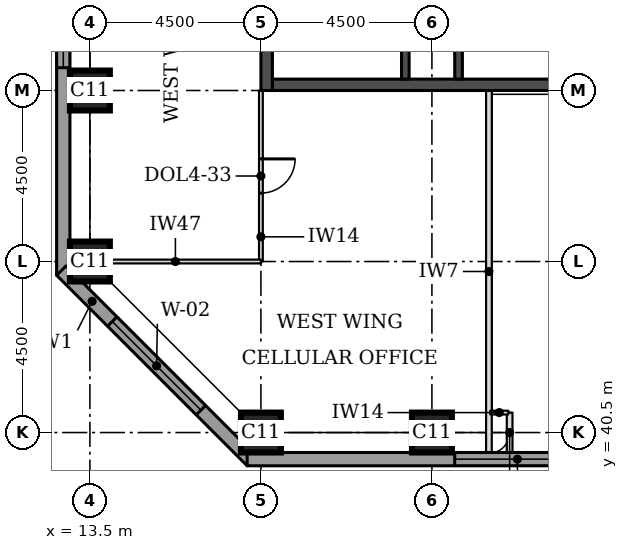
"""IFC4 building model, lengths in metres.
Left out: names, types, materials, properties, quantities, classifications, styles, units other than length and angle.
Written with IfcOpenShell. Run it as: python <this file> out.ifc"""

import sys

from ifc_helpers import new_model, si_unit, direction, frame, frame_2d, origin, origin_2d, place, context, subcontext, project, spatial, rectangle, extrude, element, fill, save


model = new_model("IFC4")
c1 = context("Model", 3, precision=1e-05, world=origin(), true_north=direction((0.0, 1.0)))
c2 = subcontext(c1, "Body", "Model", "MODEL_VIEW")
j1 = project(units=[si_unit("LENGTHUNIT", "METRE"), si_unit("PLANEANGLEUNIT", "RADIAN")], contexts=[c1])
p1 = place(None, origin())
s1 = spatial("IfcSite", under=j1, at=p1, CompositionType="ELEMENT")
p2 = place(p1, origin())
s2 = spatial("IfcBuilding", under=s1, at=p2, CompositionType="ELEMENT")
p3 = place(p2, frame((0.0, 0.0, 101.1)))
s3 = spatial("IfcBuildingStorey", under=s2, at=p3, CompositionType="ELEMENT", Elevation=101.1)
for number, where, z_axis, x_axis in (
    (1, (18.0, 40.5, 0.0), (0.0, 0.0, 1.0), (1.0, 0.0, 0.0)),
    (2, (22.5, 40.5, 0.0), (0.0, 0.0, 1.0), (1.0, 0.0, 0.0)),
    (3, (13.5, 45.0, 0.0), (0.0, 0.0, 1.0), (1.0, 0.0, 0.0)),
    (4, (13.5, 49.5, 0.0), (0.0, 0.0, 1.0), (1.0, 0.0, 0.0)),
):
    element("IfcColumn", number, at=place(p3, frame(where, z_axis=z_axis, x_axis=x_axis)), inside=s3, PredefinedType="COLUMN", context=c2, shape_type="SweptSolid", body=[
        extrude(rectangle(XDim=1.05, YDim=1.05, at=origin_2d()), origin(), (0.0, 0.0, 1.0), 3.7),
    ])
p4 = place(p3, frame((18.3, 49.65, 0.0), z_axis=(0.0, 0.0, 1.0), x_axis=(1.0, 0.0, 0.0)))
e5 = element("IfcWall", 5, at=p4, inside=s3, PredefinedType="SHEAR", context=c2, shape_type="SweptSolid", body=[
    extrude(rectangle(XDim=8.4, YDim=0.3, at=frame_2d((4.2, 0.0))), origin(), (0.0, 0.0, 1.0), 3.7),
])
p5 = place(p3, frame((18.15, 49.5, 0.0), z_axis=(0.0, 0.0, 1.0), x_axis=(0.0, 1.0, 0.0)))
e6 = element("IfcWall", 6, at=p5, inside=s3, PredefinedType="SHEAR", context=c2, shape_type="SweptSolid", body=[
    extrude(rectangle(XDim=9.0, YDim=0.3, at=frame_2d((4.5, 0.0))), origin(), (0.0, 0.0, 1.0), 3.7),
])
p6 = place(p3, frame((12.8, 58.862, 0.0), z_axis=(0.0, 0.0, 1.0), x_axis=(0.0, -1.0, 0.0)))
e7 = element("IfcWall", 7, at=p6, inside=s3, PredefinedType="STANDARD", context=c2, shape_type="SweptSolid", body=[
    extrude(rectangle(XDim=14.225, YDim=0.35, at=frame_2d((7.112, 0.0))), origin(), (0.0, 0.0, 1.0), 3.525),
])
p7 = place(p6, frame((5.462, 0.0, 0.9)))
e8 = element("IfcOpeningElement", 8, at=p7, cuts=e7, PredefinedType="OPENING", context=c2, shape_type="SweptSolid", body=[
    extrude(rectangle(XDim=3.3, YDim=1.9, at=frame_2d((1.65, 0.95))), frame((0.0, 0.185, 0.0), z_axis=(0.0, -1.0, 0.0), x_axis=(1.0, 0.0, 0.0)), (0.0, 0.0, 1.0), 0.37),
])
p8 = place(p3, frame((12.749, 44.761, 0.0), z_axis=(0.0, 0.0, 1.0), x_axis=(0.707106781187, -0.707106781187, 0.0)))
e9 = element("IfcWall", 9, at=p8, inside=s3, PredefinedType="STANDARD", context=c2, shape_type="SweptSolid", body=[
    extrude(rectangle(XDim=7.089, YDim=0.35, at=frame_2d((3.544, 0.0))), origin(), (0.0, 0.0, 1.0), 3.525),
])
p9 = place(p8, frame((1.894, 0.0, 0.9)))
e10 = element("IfcOpeningElement", 10, at=p9, cuts=e9, PredefinedType="OPENING", context=c2, shape_type="SweptSolid", body=[
    extrude(rectangle(XDim=3.3, YDim=1.9, at=frame_2d((1.65, 0.95))), frame((0.0, 0.185, 0.0), z_axis=(0.0, -1.0, 0.0), x_axis=(1.0, 0.0, 0.0)), (0.0, 0.0, 1.0), 0.37),
])
p10 = place(p3, frame((17.638, 39.8, 0.0), z_axis=(0.0, 0.0, 1.0), x_axis=(1.0, 0.0, 0.0)))
e11 = element("IfcWall", 11, at=p10, inside=s3, PredefinedType="STANDARD", context=c2, shape_type="SweptSolid", body=[
    extrude(rectangle(XDim=17.837, YDim=0.35, at=frame_2d((8.919, 0.0))), origin(), (0.0, 0.0, 1.0), 3.525),
])
p11 = place(p10, frame((5.462, 0.0, 0.9)))
e12 = element("IfcOpeningElement", 12, at=p11, cuts=e11, PredefinedType="OPENING", context=c2, shape_type="SweptSolid", body=[
    extrude(rectangle(XDim=3.3, YDim=1.9, at=frame_2d((1.65, 0.95))), frame((0.0, 0.185, 0.0), z_axis=(0.0, -1.0, 0.0), x_axis=(1.0, 0.0, 0.0)), (0.0, 0.0, 1.0), 0.37),
])
p12 = place(p10, frame((14.037, 0.0, 0.9)))
e13 = element("IfcOpeningElement", 13, at=p12, cuts=e11, PredefinedType="OPENING", context=c2, shape_type="SweptSolid", body=[
    extrude(rectangle(XDim=3.3, YDim=1.9, at=frame_2d((1.65, 0.95))), frame((0.0, 0.185, 0.0), z_axis=(0.0, -1.0, 0.0), x_axis=(1.0, 0.0, 0.0)), (0.0, 0.0, 1.0), 0.37),
])
p13 = place(p3, frame((24.0, 39.975, 0.0), z_axis=(0.0, 0.0, 1.0), x_axis=(0.0, 1.0, 0.0)))
e14 = element("IfcWall", 14, at=p13, inside=s3, PredefinedType="PARTITIONING", context=c2, shape_type="SweptSolid", body=[
    extrude(rectangle(XDim=9.525, YDim=0.15, at=frame_2d((4.762, 0.0))), origin(), (0.0, 0.0, 1.0), 3.55),
])
p14 = place(p3, frame((18.0, 49.5, 0.0), z_axis=(0.0, 0.0, 1.0), x_axis=(0.0, -1.0, 0.0)))
e15 = element("IfcWall", 15, at=p14, inside=s3, PredefinedType="PARTITIONING", context=c2, shape_type="SweptSolid", body=[
    extrude(rectangle(XDim=4.5, YDim=0.1, at=frame_2d((2.25, 0.0))), origin(), (0.0, 0.0, 1.0), 3.55),
])
p15 = place(p14, frame((1.8, 0.0, 0.0)))
e16 = element("IfcOpeningElement", 16, at=p15, cuts=e15, PredefinedType="OPENING", context=c2, shape_type="SweptSolid", body=[
    extrude(rectangle(XDim=0.9, YDim=2.1, at=frame_2d((0.45, 1.05))), frame((0.0, 0.06, 0.0), z_axis=(0.0, -1.0, 0.0), x_axis=(1.0, 0.0, 0.0)), (0.0, 0.0, 1.0), 0.12),
])
p16 = place(p3, frame((18.0, 45.0, 0.0), z_axis=(0.0, 0.0, 1.0), x_axis=(-1.0, 0.0, 0.0)))
e17 = element("IfcWall", 17, at=p16, inside=s3, PredefinedType="PARTITIONING", context=c2, shape_type="SweptSolid", body=[
    extrude(rectangle(XDim=4.5, YDim=0.1, at=frame_2d((2.25, 0.0))), origin(), (0.0, 0.0, 1.0), 2.55),
])
p17 = place(p3, frame((24.545, 39.975, 0.0), z_axis=(0.0, 0.0, 1.0), x_axis=(0.0, 1.0, 0.0)))
e18 = element("IfcWall", 18, at=p17, inside=s3, PredefinedType="PARTITIONING", context=c2, shape_type="SweptSolid", body=[
    extrude(rectangle(XDim=1.05, YDim=0.15, at=frame_2d((0.525, 0.0))), origin(), (0.0, 0.0, 1.0), 3.55),
])
p18 = place(p3, frame((24.51, 41.025, 0.0), z_axis=(0.0, 0.0, 1.0), x_axis=(-1.0, 0.0, 0.0)))
e19 = element("IfcWall", 19, at=p18, inside=s3, PredefinedType="PARTITIONING", context=c2, shape_type="SweptSolid", body=[
    extrude(rectangle(XDim=0.475, YDim=0.1, at=frame_2d((0.238, 0.0))), origin(), (0.0, 0.0, 1.0), 3.55),
])
for number, where, z_axis, x_axis in (
    (20, (21.8, 49.8, 0.0), (0.0, 0.0, 1.0), (0.0, 1.0, 0.0)),
    (21, (23.2, 49.8, 0.0), (0.0, 0.0, 1.0), (0.0, 1.0, 0.0)),
):
    element("IfcWall", number, at=place(p3, frame(where, z_axis=z_axis, x_axis=x_axis)), inside=s3, PredefinedType="SOLIDWALL", context=c2, shape_type="SweptSolid", body=[
        extrude(rectangle(XDim=6.05, YDim=0.2, at=frame_2d((3.025, 0.0))), origin(), (0.0, 0.0, 1.0), 3.55),
    ])
p19 = place(p7, origin())
e22 = element("IfcWindow", 22, at=p19, inside=s3, PartitioningType="SINGLE_PANEL", PredefinedType="WINDOW", context=c2, shape_type="SweptSolid", body=[
    extrude(rectangle(XDim=3.3, YDim=1.9, at=frame_2d((1.65, 0.95))), frame((0.0, 0.085, 0.0), z_axis=(0.0, -1.0, 0.0), x_axis=(1.0, 0.0, 0.0)), (0.0, 0.0, 1.0), 0.06),
])
fill(e8, e22)
p20 = place(p9, origin())
e23 = element("IfcWindow", 23, at=p20, inside=s3, PartitioningType="SINGLE_PANEL", PredefinedType="WINDOW", context=c2, shape_type="SweptSolid", body=[
    extrude(rectangle(XDim=3.3, YDim=1.9, at=frame_2d((1.65, 0.95))), frame((0.0, 0.085, 0.0), z_axis=(0.0, -1.0, 0.0), x_axis=(1.0, 0.0, 0.0)), (0.0, 0.0, 1.0), 0.06),
])
fill(e10, e23)
p21 = place(p11, origin())
e24 = element("IfcWindow", 24, at=p21, inside=s3, PartitioningType="SINGLE_PANEL", PredefinedType="WINDOW", context=c2, shape_type="SweptSolid", body=[
    extrude(rectangle(XDim=3.3, YDim=1.9, at=frame_2d((1.65, 0.95))), frame((0.0, 0.085, 0.0), z_axis=(0.0, -1.0, 0.0), x_axis=(1.0, 0.0, 0.0)), (0.0, 0.0, 1.0), 0.06),
])
fill(e12, e24)
p22 = place(p15, origin())
e25 = element("IfcDoor", 25, at=p22, inside=s3, OperationType="SINGLE_SWING_LEFT", PredefinedType="DOOR", context=c2, shape_type="SweptSolid", body=[
    extrude(rectangle(XDim=0.9, YDim=2.1, at=frame_2d((0.45, 1.05))), frame((0.0, 0.025, 0.0), z_axis=(0.0, -1.0, 0.0), x_axis=(1.0, 0.0, 0.0)), (0.0, 0.0, 1.0), 0.05),
])
fill(e16, e25)
save(model, sys.argv[1])
